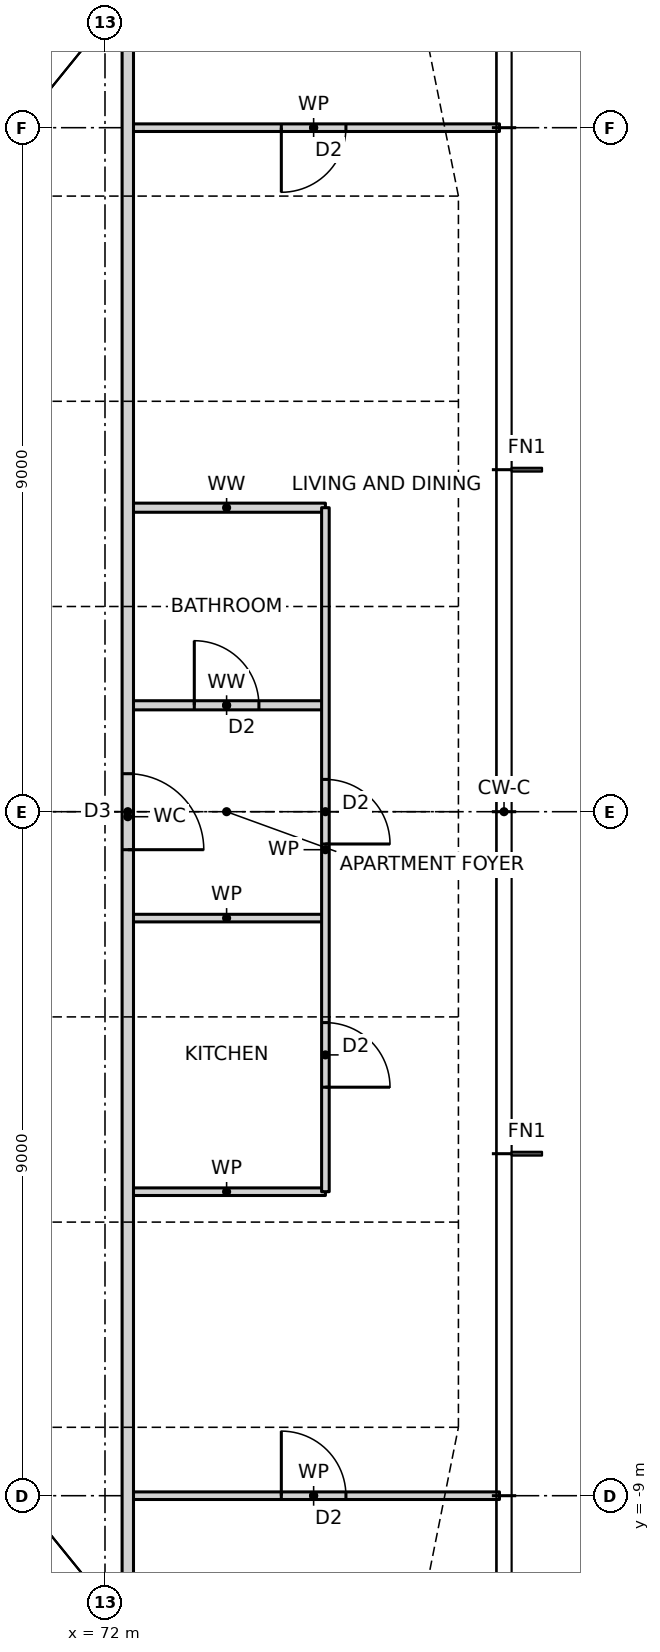
"""IFC4 building model, lengths in metres.
Left out: names, types, materials, properties, quantities, classifications, styles, units other than length and angle.
Written with IfcOpenShell. Run it as: python <this file> out.ifc"""

import sys

from ifc_helpers import new_model, si_unit, direction, frame, frame_2d, origin, place, context, subcontext, project, spatial, rectangle, extrude, element, fill, save


model = new_model("IFC4")
c1 = context("Model", 3, precision=1e-05, world=origin(), true_north=direction((0.0, 1.0)))
c2 = subcontext(c1, "Body", "Model", "MODEL_VIEW")
j1 = project(units=[si_unit("LENGTHUNIT", "METRE"), si_unit("PLANEANGLEUNIT", "RADIAN")], contexts=[c1])
p1 = place(None, origin())
s1 = spatial("IfcSite", under=j1, at=p1, CompositionType="ELEMENT")
p2 = place(p1, origin())
s2 = spatial("IfcBuilding", under=s1, at=p2, CompositionType="ELEMENT")
p3 = place(p2, frame((0.0, 0.0, 80.5)))
s3 = spatial("IfcBuildingStorey", under=s2, at=p3, CompositionType="ELEMENT", Elevation=80.5)
p4 = place(p3, frame((72.3, -9.0, 0.0), z_axis=(0.0, 0.0, 1.0), x_axis=(1.0, 0.0, 0.0)))
e1 = element("IfcWall", 1, at=p4, inside=s3, PredefinedType="PARTITIONING", context=c2, shape_type="SweptSolid", body=[
    extrude(rectangle(XDim=4.89, YDim=0.1, at=frame_2d((2.445, 0.0))), origin(), (0.0, 0.0, 1.0), 3.27),
])
p5 = place(p4, frame((2.02, 0.0, 0.0)))
e2 = element("IfcOpeningElement", 2, at=p5, cuts=e1, PredefinedType="OPENING", context=c2, shape_type="SweptSolid", body=[
    extrude(rectangle(XDim=0.85, YDim=2.1, at=frame_2d((0.425, 1.05))), frame((0.0, 0.06, 0.0), z_axis=(0.0, -1.0, 0.0), x_axis=(1.0, 0.0, 0.0)), (0.0, 0.0, 1.0), 0.12),
])
for number, where, z_axis, x_axis in (
    (3, (72.3, -5.0, 0.0), (0.0, 0.0, 1.0), (1.0, 0.0, 0.0)),
    (4, (72.3, -1.4, 0.0), (0.0, 0.0, 1.0), (1.0, 0.0, 0.0)),
):
    element("IfcWall", number, at=place(p3, frame(where, z_axis=z_axis, x_axis=x_axis)), inside=s3, PredefinedType="PARTITIONING", context=c2, shape_type="SweptSolid", body=[
        extrude(rectangle(XDim=2.6, YDim=0.1, at=frame_2d((1.3, 0.0))), origin(), (0.0, 0.0, 1.0), 3.27),
    ])
p6 = place(p3, frame((72.3, 1.4, 0.0), z_axis=(0.0, 0.0, 1.0), x_axis=(1.0, 0.0, 0.0)))
e5 = element("IfcWall", 5, at=p6, inside=s3, PredefinedType="PARTITIONING", context=c2, shape_type="SweptSolid", body=[
    extrude(rectangle(XDim=2.6, YDim=0.12, at=frame_2d((1.3, 0.0))), origin(), (0.0, 0.0, 1.0), 3.27),
])
p7 = place(p6, frame((0.875, 0.0, 0.0)))
e6 = element("IfcOpeningElement", 6, at=p7, cuts=e5, PredefinedType="OPENING", context=c2, shape_type="SweptSolid", body=[
    extrude(rectangle(XDim=0.85, YDim=2.1, at=frame_2d((0.425, 1.05))), frame((0.0, 0.07, 0.0), z_axis=(0.0, -1.0, 0.0), x_axis=(1.0, 0.0, 0.0)), (0.0, 0.0, 1.0), 0.14),
])
p8 = place(p3, frame((72.3, 4.0, 0.0), z_axis=(0.0, 0.0, 1.0), x_axis=(1.0, 0.0, 0.0)))
e7 = element("IfcWall", 7, at=p8, inside=s3, PredefinedType="PARTITIONING", context=c2, shape_type="SweptSolid", body=[
    extrude(rectangle(XDim=2.6, YDim=0.12, at=frame_2d((1.3, 0.0))), origin(), (0.0, 0.0, 1.0), 3.27),
])
p9 = place(p3, frame((72.3, 9.0, 0.0), z_axis=(0.0, 0.0, 1.0), x_axis=(1.0, 0.0, 0.0)))
e8 = element("IfcWall", 8, at=p9, inside=s3, PredefinedType="PARTITIONING", context=c2, shape_type="SweptSolid", body=[
    extrude(rectangle(XDim=4.89, YDim=0.1, at=frame_2d((2.445, 0.0))), origin(), (0.0, 0.0, 1.0), 3.27),
])
p10 = place(p9, frame((2.02, 0.0, 0.0)))
e9 = element("IfcOpeningElement", 9, at=p10, cuts=e8, PredefinedType="OPENING", context=c2, shape_type="SweptSolid", body=[
    extrude(rectangle(XDim=0.85, YDim=2.1, at=frame_2d((0.425, 1.05))), frame((0.0, 0.06, 0.0), z_axis=(0.0, -1.0, 0.0), x_axis=(1.0, 0.0, 0.0)), (0.0, 0.0, 1.0), 0.12),
])
p11 = place(p3, frame((74.9, -5.0, 0.0), z_axis=(0.0, 0.0, 1.0), x_axis=(0.0, 1.0, 0.0)))
e10 = element("IfcWall", 10, at=p11, inside=s3, PredefinedType="PARTITIONING", context=c2, shape_type="SweptSolid", body=[
    extrude(rectangle(XDim=9.0, YDim=0.1, at=frame_2d((4.5, 0.0))), origin(), (0.0, 0.0, 1.0), 3.27),
])
p12 = place(p11, frame((1.375, 0.0, 0.0)))
e11 = element("IfcOpeningElement", 11, at=p12, cuts=e10, PredefinedType="OPENING", context=c2, shape_type="SweptSolid", body=[
    extrude(rectangle(XDim=0.85, YDim=2.1, at=frame_2d((0.425, 1.05))), frame((0.0, 0.06, 0.0), z_axis=(0.0, -1.0, 0.0), x_axis=(1.0, 0.0, 0.0)), (0.0, 0.0, 1.0), 0.12),
])
p13 = place(p11, frame((4.575, 0.0, 0.0)))
e12 = element("IfcOpeningElement", 12, at=p13, cuts=e10, PredefinedType="OPENING", context=c2, shape_type="SweptSolid", body=[
    extrude(rectangle(XDim=0.85, YDim=2.1, at=frame_2d((0.425, 1.05))), frame((0.0, 0.06, 0.0), z_axis=(0.0, -1.0, 0.0), x_axis=(1.0, 0.0, 0.0)), (0.0, 0.0, 1.0), 0.12),
])
p14 = place(p3, frame((72.3, -10.9, 0.0), z_axis=(0.0, 0.0, 1.0), x_axis=(0.0, 1.0, 0.0)))
e13 = element("IfcWall", 13, at=p14, inside=s3, PredefinedType="PARTITIONING", context=c2, shape_type="SweptSolid", body=[
    extrude(rectangle(XDim=21.668, YDim=0.15, at=frame_2d((10.834, 0.0))), origin(), (0.0, 0.0, 1.0), 3.27),
])
p15 = place(p14, frame((10.4, 0.0, 0.0)))
e14 = element("IfcOpeningElement", 14, at=p15, cuts=e13, PredefinedType="OPENING", context=c2, shape_type="SweptSolid", body=[
    extrude(rectangle(XDim=1.0, YDim=2.1, at=frame_2d((0.5, 1.05))), frame((0.0, 0.085, 0.0), z_axis=(0.0, -1.0, 0.0), x_axis=(1.0, 0.0, 0.0)), (0.0, 0.0, 1.0), 0.17),
])
p16 = place(p12, frame((0.85, 0.0, 0.0), z_axis=(0.0, 0.0, 1.0), x_axis=(-1.0, 0.0, 0.0)))
e15 = element("IfcDoor", 15, at=p16, inside=s3, OperationType="SINGLE_SWING_RIGHT", PredefinedType="DOOR", context=c2, shape_type="SweptSolid", body=[
    extrude(rectangle(XDim=0.85, YDim=2.1, at=frame_2d((0.425, 1.05))), frame((0.0, 0.025, 0.0), z_axis=(0.0, -1.0, 0.0), x_axis=(1.0, 0.0, 0.0)), (0.0, 0.0, 1.0), 0.05),
])
fill(e11, e15)
p17 = place(p15, frame((1.0, 0.0, 0.0), z_axis=(0.0, 0.0, 1.0), x_axis=(-1.0, 0.0, 0.0)))
e16 = element("IfcDoor", 16, at=p17, inside=s3, OperationType="SINGLE_SWING_RIGHT", PredefinedType="DOOR", context=c2, shape_type="SweptSolid", body=[
    extrude(rectangle(XDim=1.0, YDim=2.1, at=frame_2d((0.5, 1.05))), frame((0.0, 0.025, 0.0), z_axis=(0.0, -1.0, 0.0), x_axis=(1.0, 0.0, 0.0)), (0.0, 0.0, 1.0), 0.05),
])
fill(e14, e16)
p18 = place(p13, frame((0.85, 0.0, 0.0), z_axis=(0.0, 0.0, 1.0), x_axis=(-1.0, 0.0, 0.0)))
e17 = element("IfcDoor", 17, at=p18, inside=s3, OperationType="SINGLE_SWING_RIGHT", PredefinedType="DOOR", context=c2, shape_type="SweptSolid", body=[
    extrude(rectangle(XDim=0.85, YDim=2.1, at=frame_2d((0.425, 1.05))), frame((0.0, 0.025, 0.0), z_axis=(0.0, -1.0, 0.0), x_axis=(1.0, 0.0, 0.0)), (0.0, 0.0, 1.0), 0.05),
])
fill(e12, e17)
p19 = place(p7, origin())
e18 = element("IfcDoor", 18, at=p19, inside=s3, OperationType="SINGLE_SWING_LEFT", PredefinedType="DOOR", context=c2, shape_type="SweptSolid", body=[
    extrude(rectangle(XDim=0.85, YDim=2.1, at=frame_2d((0.425, 1.05))), frame((0.0, 0.025, 0.0), z_axis=(0.0, -1.0, 0.0), x_axis=(1.0, 0.0, 0.0)), (0.0, 0.0, 1.0), 0.05),
])
fill(e6, e18)
p20 = place(p5, origin())
e19 = element("IfcDoor", 19, at=p20, inside=s3, OperationType="SINGLE_SWING_LEFT", PredefinedType="DOOR", context=c2, shape_type="SweptSolid", body=[
    extrude(rectangle(XDim=0.85, YDim=2.1, at=frame_2d((0.425, 1.05))), frame((0.0, 0.025, 0.0), z_axis=(0.0, -1.0, 0.0), x_axis=(1.0, 0.0, 0.0)), (0.0, 0.0, 1.0), 0.05),
])
fill(e2, e19)
p21 = place(p10, frame((0.85, 0.0, 0.0), z_axis=(0.0, 0.0, 1.0), x_axis=(-1.0, 0.0, 0.0)))
e20 = element("IfcDoor", 20, at=p21, inside=s3, OperationType="SINGLE_SWING_RIGHT", PredefinedType="DOOR", context=c2, shape_type="SweptSolid", body=[
    extrude(rectangle(XDim=0.85, YDim=2.1, at=frame_2d((0.425, 1.05))), frame((0.0, 0.025, 0.0), z_axis=(0.0, -1.0, 0.0), x_axis=(1.0, 0.0, 0.0)), (0.0, 0.0, 1.0), 0.05),
])
fill(e9, e20)
save(model, sys.argv[1])
